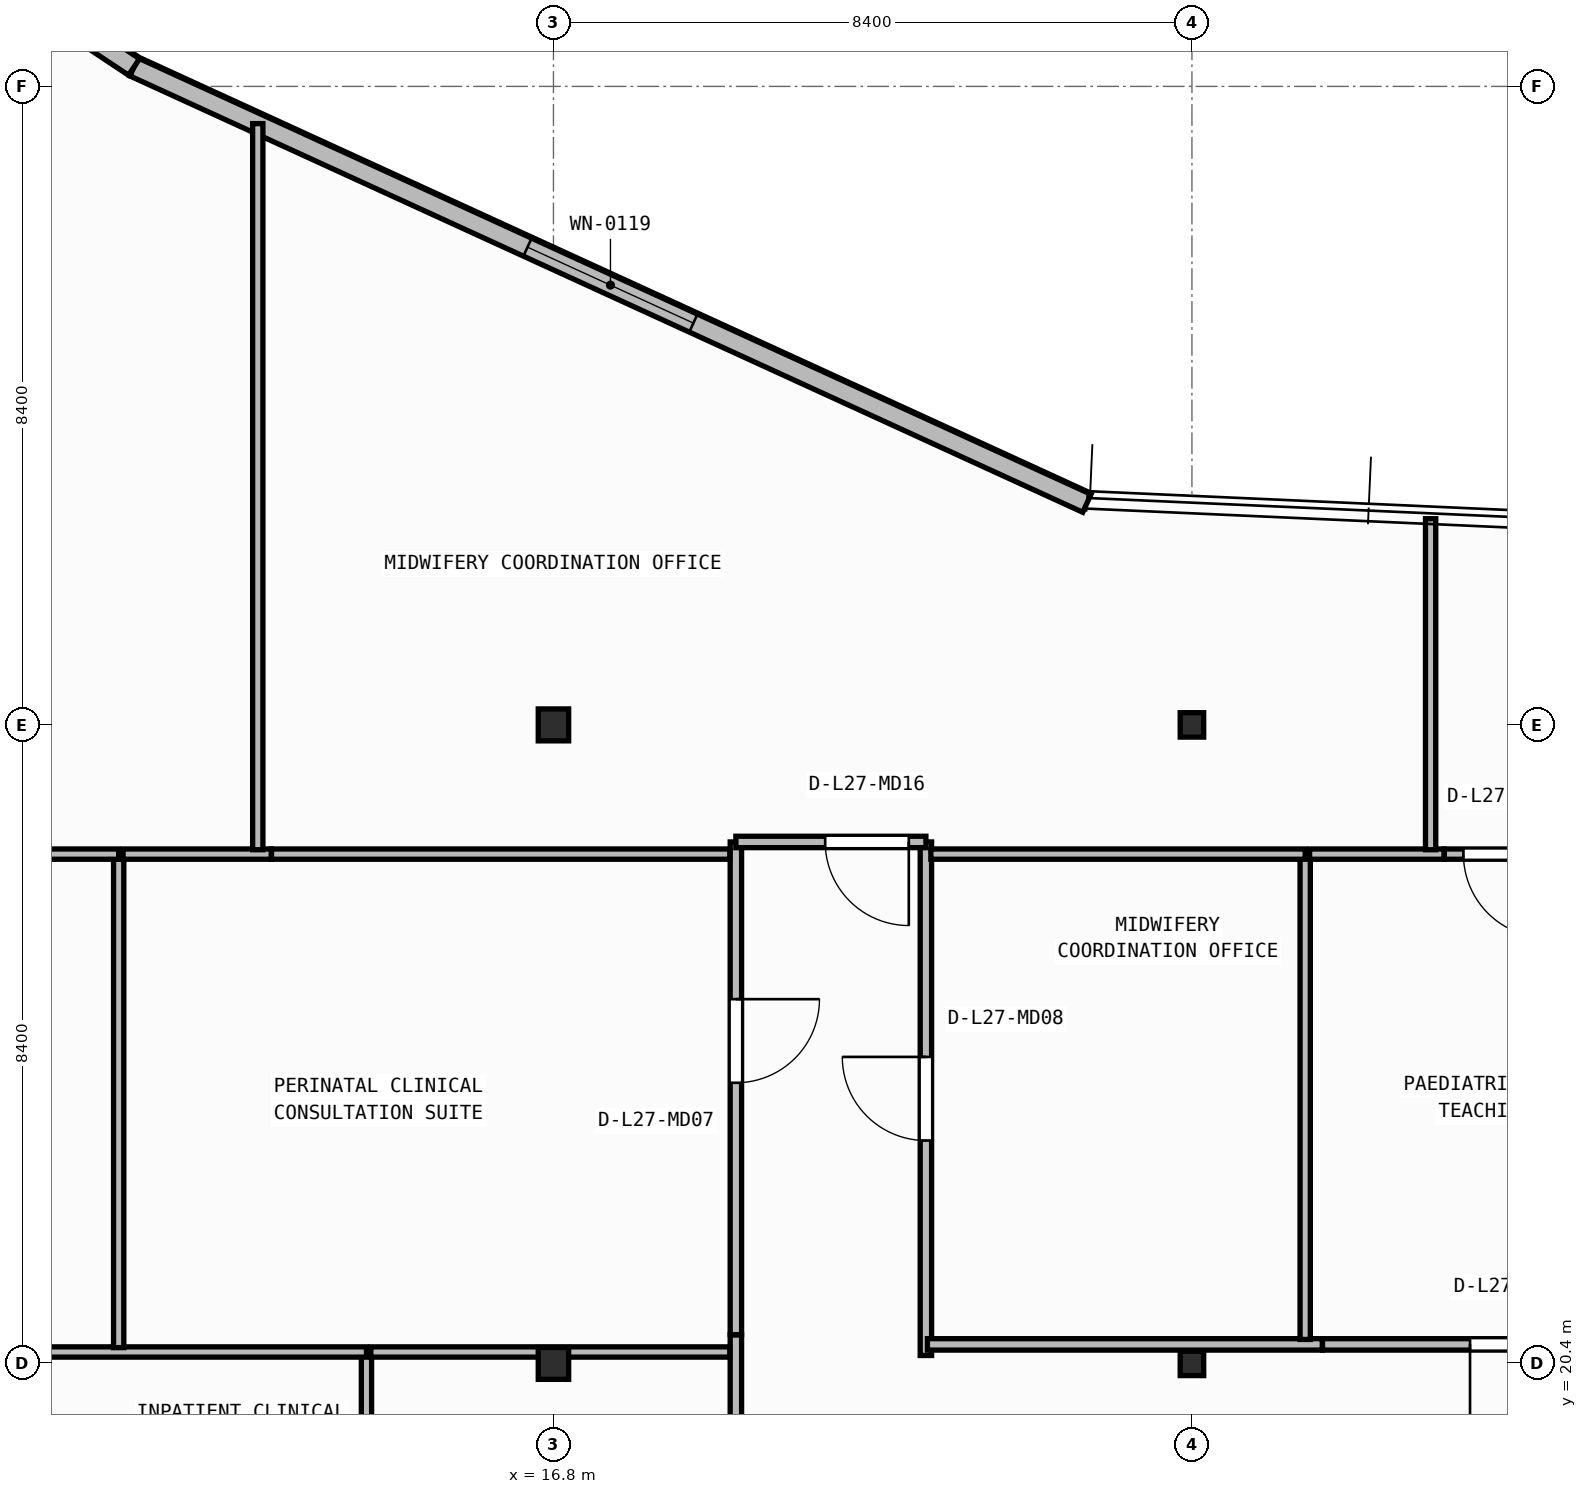
"""IFC4 building model, lengths in metres.
Left out: names, types, materials, properties, quantities, classifications, styles, units other than length and angle.
Written with IfcOpenShell. Run it as: python <this file> out.ifc"""

import sys

from ifc_helpers import new_model, si_unit, direction, frame, frame_2d, origin, origin_2d, place, context, subcontext, project, spatial, rectangle, i_section, extrude, element, fill, save


model = new_model("IFC4")
c1 = context("Model", 3, precision=1e-05, world=origin(), true_north=direction((0.0, 1.0)))
c2 = subcontext(c1, "Body", "Model", "MODEL_VIEW")
j1 = project(units=[si_unit("LENGTHUNIT", "METRE"), si_unit("PLANEANGLEUNIT", "RADIAN")], contexts=[c1])
p1 = place(None, origin())
s1 = spatial("IfcSite", under=j1, at=p1, CompositionType="ELEMENT")
p2 = place(p1, origin())
s2 = spatial("IfcBuilding", under=s1, at=p2, CompositionType="ELEMENT")
p3 = place(p2, frame((0.0, 0.0, 111.25)))
s3 = spatial("IfcBuildingStorey", under=s2, at=p3, CompositionType="ELEMENT", Elevation=111.25)
p4 = place(p3, frame((16.8, 20.4, 0.0), z_axis=(0.0, 0.0, 1.0), x_axis=(1.0, 0.0, 0.0)))
e1 = element("IfcColumn", 1, at=p4, inside=s3, PredefinedType="COLUMN", context=c2, shape_type="SweptSolid", body=[
    extrude(i_section(OverallWidth=0.4, OverallDepth=0.42, WebThickness=0.025, FlangeThickness=0.04, at=origin_2d()), origin(), (0.0, 0.0, 1.0), 3.95),
])
p5 = place(p3, frame((25.2, 20.4, 0.0), z_axis=(0.0, 0.0, 1.0), x_axis=(1.0, 0.0, 0.0)))
e2 = element("IfcColumn", 2, at=p5, inside=s3, PredefinedType="COLUMN", context=c2, shape_type="SweptSolid", body=[
    extrude(i_section(OverallWidth=0.309, OverallDepth=0.321, WebThickness=0.014, FlangeThickness=0.022, FilletRadius=0.017, at=origin_2d()), origin(), (0.0, 0.0, 1.0), 3.95),
])
p6 = place(p3, frame((16.8, 28.8, 0.0), z_axis=(0.0, 0.0, 1.0), x_axis=(1.0, 0.0, 0.0)))
e3 = element("IfcColumn", 3, at=p6, inside=s3, PredefinedType="COLUMN", context=c2, shape_type="SweptSolid", body=[
    extrude(i_section(OverallWidth=0.4, OverallDepth=0.42, WebThickness=0.025, FlangeThickness=0.04, at=origin_2d()), origin(), (0.0, 0.0, 1.0), 3.95),
])
p7 = place(p3, frame((25.2, 28.8, 0.0), z_axis=(0.0, 0.0, 1.0), x_axis=(1.0, 0.0, 0.0)))
e4 = element("IfcColumn", 4, at=p7, inside=s3, PredefinedType="COLUMN", context=c2, shape_type="SweptSolid", body=[
    extrude(i_section(OverallWidth=0.309, OverallDepth=0.321, WebThickness=0.014, FlangeThickness=0.022, FilletRadius=0.017, at=origin_2d()), origin(), (0.0, 0.0, 1.0), 3.95),
])
p8 = place(p3, frame((23.818, 31.716, 0.0), z_axis=(0.0, 0.0, 1.0), x_axis=(-0.909209527513, 0.416338846471, 0.0)))
e5 = element("IfcWall", 5, at=p8, inside=s3, PredefinedType="STANDARD", context=c2, shape_type="SweptSolid", body=[
    extrude(rectangle(XDim=13.787, YDim=0.26, at=frame_2d((6.894, 0.0))), origin(), (0.0, 0.0, 1.0), 3.71),
])
p9 = place(p8, frame((5.694, 0.0, 0.9)))
e6 = element("IfcOpeningElement", 6, at=p9, cuts=e5, PredefinedType="OPENING", context=c2, shape_type="SweptSolid", body=[
    extrude(rectangle(XDim=2.4, YDim=1.65, at=frame_2d((1.2, 0.825))), frame((0.0, 0.14, 0.0), z_axis=(0.0, -1.0, 0.0), x_axis=(1.0, 0.0, 0.0)), (0.0, 0.0, 1.0), 0.28),
])
p10 = place(p3, frame((11.282, 37.456, 0.0), z_axis=(0.0, 0.0, 1.0), x_axis=(-0.833630474253, 0.552322580017, 0.0)))
e7 = element("IfcWall", 7, at=p10, inside=s3, PredefinedType="STANDARD", context=c2, shape_type="SweptSolid", body=[
    extrude(rectangle(XDim=10.223, YDim=0.26, at=frame_2d((5.111, 0.0))), origin(), (0.0, 0.0, 1.0), 3.71),
])
p11 = place(p10, frame((3.911, 0.0, 0.9)))
e8 = element("IfcOpeningElement", 8, at=p11, cuts=e7, PredefinedType="OPENING", context=c2, shape_type="SweptSolid", body=[
    extrude(rectangle(XDim=2.4, YDim=1.65, at=frame_2d((1.2, 0.825))), frame((0.0, 0.14, 0.0), z_axis=(0.0, -1.0, 0.0), x_axis=(1.0, 0.0, 0.0)), (0.0, 0.0, 1.0), 0.28),
])
p12 = place(p3, frame((19.2, 20.776, 0.0), z_axis=(0.0, 0.0, 1.0), x_axis=(0.0, -1.0, 0.0)))
e9 = element("IfcWall", 9, at=p12, inside=s3, PredefinedType="PARTITIONING", context=c2, shape_type="SweptSolid", body=[
    extrude(rectangle(XDim=6.076, YDim=0.15, at=frame_2d((3.038, 0.0))), origin(), (0.0, 0.0, 1.0), 3.71),
])
p13 = place(p3, frame((19.2, 27.26, 0.0), z_axis=(0.0, 0.0, 1.0), x_axis=(0.0, -1.0, 0.0)))
e10 = element("IfcWall", 10, at=p13, inside=s3, PredefinedType="PARTITIONING", context=c2, shape_type="SweptSolid", body=[
    extrude(rectangle(XDim=6.482, YDim=0.15, at=frame_2d((3.241, 0.0))), origin(), (0.0, 0.0, 1.0), 3.71),
])
p14 = place(p13, frame((2.068, 0.0, 0.0)))
e11 = element("IfcOpeningElement", 11, at=p14, cuts=e10, PredefinedType="OPENING", context=c2, shape_type="SweptSolid", body=[
    extrude(rectangle(XDim=1.1, YDim=2.1, at=frame_2d((0.55, 1.05))), frame((0.0, 0.085, 0.0), z_axis=(0.0, -1.0, 0.0), x_axis=(1.0, 0.0, 0.0)), (0.0, 0.0, 1.0), 0.17),
])
p15 = place(p3, frame((21.7, 20.504, 0.0), z_axis=(0.0, 0.0, 1.0), x_axis=(0.0, 1.0, 0.0)))
e12 = element("IfcWall", 12, at=p15, inside=s3, PredefinedType="PARTITIONING", context=c2, shape_type="SweptSolid", body=[
    extrude(rectangle(XDim=6.756, YDim=0.15, at=frame_2d((3.378, 0.0))), origin(), (0.0, 0.0, 1.0), 3.71),
])
p16 = place(p15, frame((2.828, 0.0, 0.0)))
e13 = element("IfcOpeningElement", 13, at=p16, cuts=e12, PredefinedType="OPENING", context=c2, shape_type="SweptSolid", body=[
    extrude(rectangle(XDim=1.1, YDim=2.1, at=frame_2d((0.55, 1.05))), frame((0.0, 0.085, 0.0), z_axis=(0.0, -1.0, 0.0), x_axis=(1.0, 0.0, 0.0)), (0.0, 0.0, 1.0), 0.17),
])
p17 = place(p3, frame((21.7, 27.26, 0.0), z_axis=(0.0, 0.0, 1.0), x_axis=(-1.0, 0.0, 0.0)))
e14 = element("IfcWall", 14, at=p17, inside=s3, PredefinedType="PARTITIONING", context=c2, shape_type="SweptSolid", body=[
    extrude(rectangle(XDim=2.5, YDim=0.15, at=frame_2d((1.25, 0.0))), origin(), (0.0, 0.0, 1.0), 3.71),
])
p18 = place(p17, frame((0.225, 0.0, 0.0)))
e15 = element("IfcOpeningElement", 15, at=p18, cuts=e14, PredefinedType="OPENING", context=c2, shape_type="SweptSolid", body=[
    extrude(rectangle(XDim=1.1, YDim=2.1, at=frame_2d((0.55, 1.05))), frame((0.0, 0.085, 0.0), z_axis=(0.0, -1.0, 0.0), x_axis=(1.0, 0.0, 0.0)), (0.0, 0.0, 1.0), 0.17),
])
p19 = place(p3, frame((26.916, 20.65, 0.0), z_axis=(0.0, 0.0, 1.0), x_axis=(-1.0, 0.0, 0.0)))
e16 = element("IfcWall", 16, at=p19, inside=s3, PredefinedType="PARTITIONING", context=c2, shape_type="SweptSolid", body=[
    extrude(rectangle(XDim=5.196, YDim=0.15, at=frame_2d((2.598, 0.0))), origin(), (0.0, 0.0, 1.0), 3.083),
])
p20 = place(p3, frame((32.286, 20.65, 0.0), z_axis=(0.0, 0.0, 1.0), x_axis=(-1.0, 0.0, 0.0)))
e17 = element("IfcWall", 17, at=p20, inside=s3, PredefinedType="PARTITIONING", context=c2, shape_type="SweptSolid", body=[
    extrude(rectangle(XDim=5.368, YDim=0.15, at=frame_2d((2.684, 0.0))), origin(), (0.0, 0.0, 1.0), 3.083),
])
p21 = place(p20, frame((2.327, 0.0, 0.0)))
e18 = element("IfcOpeningElement", 18, at=p21, cuts=e17, PredefinedType="OPENING", context=c2, shape_type="SweptSolid", body=[
    extrude(rectangle(XDim=1.1, YDim=2.1, at=frame_2d((0.55, 1.05))), frame((0.0, 0.085, 0.0), z_axis=(0.0, -1.0, 0.0), x_axis=(1.0, 0.0, 0.0)), (0.0, 0.0, 1.0), 0.17),
])
p22 = place(p3, frame((14.34, 17.833, 0.0), z_axis=(0.0, 0.0, 1.0), x_axis=(0.0, 1.0, 0.0)))
e19 = element("IfcWall", 19, at=p22, inside=s3, PredefinedType="PARTITIONING", context=c2, shape_type="SweptSolid", body=[
    extrude(rectangle(XDim=2.718, YDim=0.135, at=frame_2d((1.359, 0.0))), origin(), (0.0, 0.0, 1.0), 3.71),
])
p23 = place(p3, frame((14.34, 20.55, 0.0), z_axis=(0.0, 0.0, 1.0), x_axis=(-1.0, 0.0, 0.0)))
e20 = element("IfcWall", 20, at=p23, inside=s3, PredefinedType="PARTITIONING", context=c2, shape_type="SweptSolid", body=[
    extrude(rectangle(XDim=4.282, YDim=0.135, at=frame_2d((2.141, 0.0))), origin(), (0.0, 0.0, 1.0), 3.083),
])
p24 = place(p3, frame((19.12, 20.55, 0.0), z_axis=(0.0, 0.0, 1.0), x_axis=(-1.0, 0.0, 0.0)))
e21 = element("IfcWall", 21, at=p24, inside=s3, PredefinedType="PARTITIONING", context=c2, shape_type="SweptSolid", body=[
    extrude(rectangle(XDim=4.723, YDim=0.135, at=frame_2d((2.361, 0.0))), origin(), (0.0, 0.0, 1.0), 3.083),
])
p25 = place(p3, frame((11.08, 20.607, 0.0), z_axis=(0.0, 0.0, 1.0), x_axis=(0.0, 1.0, 0.0)))
e22 = element("IfcWall", 22, at=p25, inside=s3, PredefinedType="PARTITIONING", context=c2, shape_type="SweptSolid", body=[
    extrude(rectangle(XDim=6.493, YDim=0.135, at=frame_2d((3.246, 0.0))), origin(), (0.0, 0.0, 1.0), 3.71),
])
p26 = place(p3, frame((11.08, 27.1, 0.0), z_axis=(0.0, 0.0, 1.0), x_axis=(-1.0, 0.0, 0.0)))
e23 = element("IfcWall", 23, at=p26, inside=s3, PredefinedType="PARTITIONING", context=c2, shape_type="SweptSolid", body=[
    extrude(rectangle(XDim=6.532, YDim=0.135, at=frame_2d((3.266, 0.0))), origin(), (0.0, 0.0, 1.0), 3.71),
])
p27 = place(p3, frame((13.088, 27.1, 0.0), z_axis=(0.0, 0.0, 1.0), x_axis=(-1.0, 0.0, 0.0)))
e24 = element("IfcWall", 24, at=p27, inside=s3, PredefinedType="PARTITIONING", context=c2, shape_type="SweptSolid", body=[
    extrude(rectangle(XDim=1.951, YDim=0.135, at=frame_2d((0.976, 0.0))), origin(), (0.0, 0.0, 1.0), 3.71),
])
p28 = place(p3, frame((19.12, 27.1, 0.0), z_axis=(0.0, 0.0, 1.0), x_axis=(-1.0, 0.0, 0.0)))
e25 = element("IfcWall", 25, at=p28, inside=s3, PredefinedType="PARTITIONING", context=c2, shape_type="SweptSolid", body=[
    extrude(rectangle(XDim=6.03, YDim=0.135, at=frame_2d((3.015, 0.0))), origin(), (0.0, 0.0, 1.0), 3.71),
])
p29 = place(p3, frame((26.69, 20.715, 0.0), z_axis=(0.0, 0.0, 1.0), x_axis=(0.0, 1.0, 0.0)))
e26 = element("IfcWall", 26, at=p29, inside=s3, PredefinedType="PARTITIONING", context=c2, shape_type="SweptSolid", body=[
    extrude(rectangle(XDim=6.385, YDim=0.135, at=frame_2d((3.192, 0.0))), origin(), (0.0, 0.0, 1.0), 3.71),
])
p30 = place(p3, frame((26.69, 27.1, 0.0), z_axis=(0.0, 0.0, 1.0), x_axis=(-1.0, 0.0, 0.0)))
e27 = element("IfcWall", 27, at=p30, inside=s3, PredefinedType="PARTITIONING", context=c2, shape_type="SweptSolid", body=[
    extrude(rectangle(XDim=4.925, YDim=0.135, at=frame_2d((2.462, 0.0))), origin(), (0.0, 0.0, 1.0), 3.71),
])
p31 = place(p3, frame((28.519, 27.1, 0.0), z_axis=(0.0, 0.0, 1.0), x_axis=(-1.0, 0.0, 0.0)))
e28 = element("IfcWall", 28, at=p31, inside=s3, PredefinedType="PARTITIONING", context=c2, shape_type="SweptSolid", body=[
    extrude(rectangle(XDim=1.771, YDim=0.135, at=frame_2d((0.885, 0.0))), origin(), (0.0, 0.0, 1.0), 3.71),
])
p32 = place(p3, frame((32.06, 27.1, 0.0), z_axis=(0.0, 0.0, 1.0), x_axis=(-1.0, 0.0, 0.0)))
e29 = element("IfcWall", 29, at=p32, inside=s3, PredefinedType="PARTITIONING", context=c2, shape_type="SweptSolid", body=[
    extrude(rectangle(XDim=3.54, YDim=0.135, at=frame_2d((1.77, 0.0))), origin(), (0.0, 0.0, 1.0), 3.71),
])
p33 = place(p32, frame((2.188, 0.0, 0.0)))
e30 = element("IfcOpeningElement", 30, at=p33, cuts=e29, PredefinedType="OPENING", context=c2, shape_type="SweptSolid", body=[
    extrude(rectangle(XDim=1.1, YDim=2.1, at=frame_2d((0.55, 1.05))), frame((0.0, 0.077, 0.0), z_axis=(0.0, -1.0, 0.0), x_axis=(1.0, 0.0, 0.0)), (0.0, 0.0, 1.0), 0.155),
])
p34 = place(p3, frame((12.91, 27.157, 0.0), z_axis=(0.0, 0.0, 1.0), x_axis=(0.0, 1.0, 0.0)))
e31 = element("IfcWall", 31, at=p34, inside=s3, PredefinedType="PARTITIONING", context=c2, shape_type="SweptSolid", body=[
    extrude(rectangle(XDim=9.553, YDim=0.135, at=frame_2d((4.776, 0.0))), origin(), (0.0, 0.0, 1.0), 3.71),
])
p35 = place(p3, frame((28.34, 27.157, 0.0), z_axis=(0.0, 0.0, 1.0), x_axis=(0.0, 1.0, 0.0)))
e32 = element("IfcWall", 32, at=p35, inside=s3, PredefinedType="PARTITIONING", context=c2, shape_type="SweptSolid", body=[
    extrude(rectangle(XDim=4.355, YDim=0.135, at=frame_2d((2.178, 0.0))), origin(), (0.0, 0.0, 1.0), 3.71),
])
p36 = place(p9, origin())
e33 = element("IfcWindow", 33, at=p36, inside=s3, PartitioningType="SINGLE_PANEL", PredefinedType="WINDOW", context=c2, shape_type="SweptSolid", body=[
    extrude(rectangle(XDim=2.4, YDim=1.65, at=frame_2d((1.2, 0.825))), frame((0.0, 0.03, 0.0), z_axis=(0.0, -1.0, 0.0), x_axis=(1.0, 0.0, 0.0)), (0.0, 0.0, 1.0), 0.06),
])
fill(e6, e33)
p37 = place(p14, origin())
e34 = element("IfcDoor", 34, at=p37, inside=s3, OperationType="SINGLE_SWING_LEFT", PredefinedType="DOOR", context=c2, shape_type="SweptSolid", body=[
    extrude(rectangle(XDim=1.1, YDim=2.1, at=frame_2d((0.55, 1.05))), frame((0.0, 0.025, 0.0), z_axis=(0.0, -1.0, 0.0), x_axis=(1.0, 0.0, 0.0)), (0.0, 0.0, 1.0), 0.05),
])
fill(e11, e34)
p38 = place(p16, origin())
e35 = element("IfcDoor", 35, at=p38, inside=s3, OperationType="SINGLE_SWING_RIGHT", PredefinedType="DOOR", context=c2, shape_type="SweptSolid", body=[
    extrude(rectangle(XDim=1.1, YDim=2.1, at=frame_2d((0.55, 1.05))), frame((0.0, 0.025, 0.0), z_axis=(0.0, -1.0, 0.0), x_axis=(1.0, 0.0, 0.0)), (0.0, 0.0, 1.0), 0.05),
])
fill(e13, e35)
p39 = place(p18, origin())
e36 = element("IfcDoor", 36, at=p39, inside=s3, OperationType="SINGLE_SWING_LEFT", PredefinedType="DOOR", context=c2, shape_type="SweptSolid", body=[
    extrude(rectangle(XDim=1.1, YDim=2.1, at=frame_2d((0.55, 1.05))), frame((0.0, 0.025, 0.0), z_axis=(0.0, -1.0, 0.0), x_axis=(1.0, 0.0, 0.0)), (0.0, 0.0, 1.0), 0.05),
])
fill(e15, e36)
p40 = place(p21, origin())
e37 = element("IfcDoor", 37, at=p40, inside=s3, OperationType="SINGLE_SWING_RIGHT", PredefinedType="DOOR", context=c2, shape_type="SweptSolid", body=[
    extrude(rectangle(XDim=1.1, YDim=2.1, at=frame_2d((0.55, 1.05))), frame((0.0, 0.025, 0.0), z_axis=(0.0, -1.0, 0.0), x_axis=(1.0, 0.0, 0.0)), (0.0, 0.0, 1.0), 0.05),
])
fill(e18, e37)
p41 = place(p33, origin())
e38 = element("IfcDoor", 38, at=p41, inside=s3, OperationType="SINGLE_SWING_LEFT", PredefinedType="DOOR", context=c2, shape_type="SweptSolid", body=[
    extrude(rectangle(XDim=1.1, YDim=2.1, at=frame_2d((0.55, 1.05))), frame((0.0, 0.025, 0.0), z_axis=(0.0, -1.0, 0.0), x_axis=(1.0, 0.0, 0.0)), (0.0, 0.0, 1.0), 0.05),
])
fill(e30, e38)
save(model, sys.argv[1])
